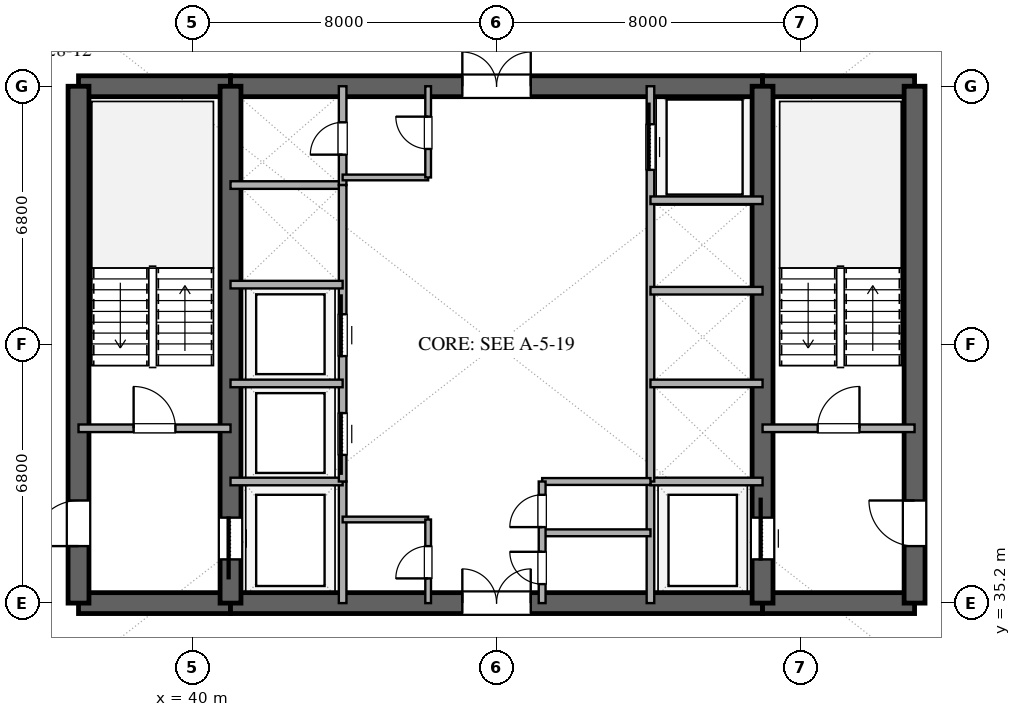
"""IFC4 building model, lengths in metres.
Left out: names, types, materials, properties, quantities, classifications, styles, units other than length and angle.
Written with IfcOpenShell. Run it as: python <this file> out.ifc"""

import sys

from ifc_helpers import new_model, si_unit, direction, frame, frame_2d, origin, place, context, subcontext, project, spatial, rectangle, extrude, element, fill, save


model = new_model("IFC4")
c1 = context("Model", 3, precision=1e-05, world=origin(), true_north=direction((0.0, 1.0)))
c2 = subcontext(c1, "Body", "Model", "MODEL_VIEW")
j1 = project(units=[si_unit("LENGTHUNIT", "METRE"), si_unit("PLANEANGLEUNIT", "RADIAN")], contexts=[c1])
p1 = place(None, origin())
s1 = spatial("IfcSite", under=j1, at=p1, CompositionType="ELEMENT")
p2 = place(p1, origin())
s2 = spatial("IfcBuilding", under=s1, at=p2, CompositionType="ELEMENT")
p3 = place(p2, frame((0.0, 0.0, 112.8)))
s3 = spatial("IfcBuildingStorey", under=s2, at=p3, CompositionType="ELEMENT", Elevation=112.8)
p4 = place(p3, frame((37.0, 35.2, 0.0), z_axis=(0.0, 0.0, 1.0), x_axis=(1.0, 0.0, 0.0)))
e1 = element("IfcWall", 1, at=p4, inside=s3, PredefinedType="SHEAR", context=c2, shape_type="SweptSolid", body=[
    extrude(rectangle(XDim=4.0, YDim=0.55, at=frame_2d((2.0, 0.0))), origin(), (0.0, 0.0, 1.0), 3.38),
])
p5 = place(p3, frame((41.0, 35.2, 0.0), z_axis=(0.0, 0.0, 1.0), x_axis=(1.0, 0.0, 0.0)))
e2 = element("IfcWall", 2, at=p5, inside=s3, PredefinedType="SHEAR", context=c2, shape_type="SweptSolid", body=[
    extrude(rectangle(XDim=14.0, YDim=0.55, at=frame_2d((7.0, 0.0))), origin(), (0.0, 0.0, 1.0), 3.38),
])
p6 = place(p5, frame((6.1, 0.0, 0.0)))
e3 = element("IfcOpeningElement", 3, at=p6, cuts=e2, PredefinedType="OPENING", context=c2, shape_type="SweptSolid", body=[
    extrude(rectangle(XDim=1.8, YDim=2.25, at=frame_2d((0.9, 1.125))), frame((0.0, 0.285, 0.0), z_axis=(0.0, -1.0, 0.0), x_axis=(1.0, 0.0, 0.0)), (0.0, 0.0, 1.0), 0.57),
])
for number, where, z_axis, x_axis in (
    (4, (55.0, 35.2, 0.0), (0.0, 0.0, 1.0), (1.0, 0.0, 0.0)),
    (5, (37.0, 48.8, 0.0), (0.0, 0.0, 1.0), (1.0, 0.0, 0.0)),
):
    element("IfcWall", number, at=place(p3, frame(where, z_axis=z_axis, x_axis=x_axis)), inside=s3, PredefinedType="SHEAR", context=c2, shape_type="SweptSolid", body=[
        extrude(rectangle(XDim=4.0, YDim=0.55, at=frame_2d((2.0, 0.0))), origin(), (0.0, 0.0, 1.0), 3.38),
    ])
p7 = place(p3, frame((41.0, 48.8, 0.0), z_axis=(0.0, 0.0, 1.0), x_axis=(1.0, 0.0, 0.0)))
e6 = element("IfcWall", 6, at=p7, inside=s3, PredefinedType="SHEAR", context=c2, shape_type="SweptSolid", body=[
    extrude(rectangle(XDim=14.0, YDim=0.55, at=frame_2d((7.0, 0.0))), origin(), (0.0, 0.0, 1.0), 3.38),
])
p8 = place(p7, frame((6.1, 0.0, 0.0)))
e7 = element("IfcOpeningElement", 7, at=p8, cuts=e6, PredefinedType="OPENING", context=c2, shape_type="SweptSolid", body=[
    extrude(rectangle(XDim=1.8, YDim=2.25, at=frame_2d((0.9, 1.125))), frame((0.0, 0.285, 0.0), z_axis=(0.0, -1.0, 0.0), x_axis=(1.0, 0.0, 0.0)), (0.0, 0.0, 1.0), 0.57),
])
p9 = place(p3, frame((55.0, 48.8, 0.0), z_axis=(0.0, 0.0, 1.0), x_axis=(1.0, 0.0, 0.0)))
e8 = element("IfcWall", 8, at=p9, inside=s3, PredefinedType="SHEAR", context=c2, shape_type="SweptSolid", body=[
    extrude(rectangle(XDim=4.0, YDim=0.55, at=frame_2d((2.0, 0.0))), origin(), (0.0, 0.0, 1.0), 3.38),
])
p10 = place(p3, frame((37.0, 35.2, 0.0), z_axis=(0.0, 0.0, 1.0), x_axis=(0.0, 1.0, 0.0)))
e9 = element("IfcWall", 9, at=p10, inside=s3, PredefinedType="SHEAR", context=c2, shape_type="SweptSolid", body=[
    extrude(rectangle(XDim=13.6, YDim=0.55, at=frame_2d((6.8, 0.0))), origin(), (0.0, 0.0, 1.0), 3.38),
])
p11 = place(p10, frame((1.5, 0.0, 0.0)))
e10 = element("IfcOpeningElement", 10, at=p11, cuts=e9, PredefinedType="OPENING", context=c2, shape_type="SweptSolid", body=[
    extrude(rectangle(XDim=1.2, YDim=2.15, at=frame_2d((0.6, 1.075))), frame((0.0, 0.285, 0.0), z_axis=(0.0, -1.0, 0.0), x_axis=(1.0, 0.0, 0.0)), (0.0, 0.0, 1.0), 0.57),
])
p12 = place(p3, frame((59.0, 35.2, 0.0), z_axis=(0.0, 0.0, 1.0), x_axis=(0.0, 1.0, 0.0)))
e11 = element("IfcWall", 11, at=p12, inside=s3, PredefinedType="SHEAR", context=c2, shape_type="SweptSolid", body=[
    extrude(rectangle(XDim=13.6, YDim=0.55, at=frame_2d((6.8, 0.0))), origin(), (0.0, 0.0, 1.0), 3.38),
])
p13 = place(p12, frame((1.5, 0.0, 0.0)))
e12 = element("IfcOpeningElement", 12, at=p13, cuts=e11, PredefinedType="OPENING", context=c2, shape_type="SweptSolid", body=[
    extrude(rectangle(XDim=1.2, YDim=2.15, at=frame_2d((0.6, 1.075))), frame((0.0, 0.285, 0.0), z_axis=(0.0, -1.0, 0.0), x_axis=(1.0, 0.0, 0.0)), (0.0, 0.0, 1.0), 0.57),
])
p14 = place(p3, frame((41.0, 35.2, 0.0), z_axis=(0.0, 0.0, 1.0), x_axis=(0.0, 1.0, 0.0)))
e13 = element("IfcWall", 13, at=p14, inside=s3, PredefinedType="SHEAR", context=c2, shape_type="SweptSolid", body=[
    extrude(rectangle(XDim=13.6, YDim=0.55, at=frame_2d((6.8, 0.0))), origin(), (0.0, 0.0, 1.0), 3.38),
])
p15 = place(p14, frame((1.15, 0.0, 0.0)))
e14 = element("IfcOpeningElement", 14, at=p15, cuts=e13, PredefinedType="OPENING", context=c2, shape_type="SweptSolid", body=[
    extrude(rectangle(XDim=1.1, YDim=2.2, at=frame_2d((0.55, 1.1))), frame((0.0, 0.285, 0.0), z_axis=(0.0, -1.0, 0.0), x_axis=(1.0, 0.0, 0.0)), (0.0, 0.0, 1.0), 0.57),
])
p16 = place(p3, frame((55.0, 35.2, 0.0), z_axis=(0.0, 0.0, 1.0), x_axis=(0.0, 1.0, 0.0)))
e15 = element("IfcWall", 15, at=p16, inside=s3, PredefinedType="SHEAR", context=c2, shape_type="SweptSolid", body=[
    extrude(rectangle(XDim=13.6, YDim=0.55, at=frame_2d((6.8, 0.0))), origin(), (0.0, 0.0, 1.0), 3.38),
])
p17 = place(p16, frame((1.15, 0.0, 0.0)))
e16 = element("IfcOpeningElement", 16, at=p17, cuts=e15, PredefinedType="OPENING", context=c2, shape_type="SweptSolid", body=[
    extrude(rectangle(XDim=1.1, YDim=2.2, at=frame_2d((0.55, 1.1))), frame((0.0, 0.285, 0.0), z_axis=(0.0, -1.0, 0.0), x_axis=(1.0, 0.0, 0.0)), (0.0, 0.0, 1.0), 0.57),
])
p18 = place(p3, frame((37.0, 39.8, 0.0), z_axis=(0.0, 0.0, 1.0), x_axis=(1.0, 0.0, 0.0)))
e17 = element("IfcWall", 17, at=p18, inside=s3, PredefinedType="SOLIDWALL", context=c2, shape_type="SweptSolid", body=[
    extrude(rectangle(XDim=4.0, YDim=0.2, at=frame_2d((2.0, 0.0))), origin(), (0.0, 0.0, 1.0), 2.74),
])
p19 = place(p18, frame((1.45, 0.0, 0.0)))
e18 = element("IfcOpeningElement", 18, at=p19, cuts=e17, PredefinedType="OPENING", context=c2, shape_type="SweptSolid", body=[
    extrude(rectangle(XDim=1.1, YDim=2.15, at=frame_2d((0.55, 1.075))), frame((0.0, 0.11, 0.0), z_axis=(0.0, -1.0, 0.0), x_axis=(1.0, 0.0, 0.0)), (0.0, 0.0, 1.0), 0.22),
])
p20 = place(p3, frame((55.0, 39.8, 0.0), z_axis=(0.0, 0.0, 1.0), x_axis=(1.0, 0.0, 0.0)))
e19 = element("IfcWall", 19, at=p20, inside=s3, PredefinedType="SOLIDWALL", context=c2, shape_type="SweptSolid", body=[
    extrude(rectangle(XDim=4.0, YDim=0.2, at=frame_2d((2.0, 0.0))), origin(), (0.0, 0.0, 1.0), 2.74),
])
p21 = place(p20, frame((1.45, 0.0, 0.0)))
e20 = element("IfcOpeningElement", 20, at=p21, cuts=e19, PredefinedType="OPENING", context=c2, shape_type="SweptSolid", body=[
    extrude(rectangle(XDim=1.1, YDim=2.15, at=frame_2d((0.55, 1.075))), frame((0.0, 0.11, 0.0), z_axis=(0.0, -1.0, 0.0), x_axis=(1.0, 0.0, 0.0)), (0.0, 0.0, 1.0), 0.22),
])
p22 = place(p3, frame((43.95, 35.2, 0.0), z_axis=(0.0, 0.0, 1.0), x_axis=(0.0, 1.0, 0.0)))
e21 = element("IfcWall", 21, at=p22, inside=s3, PredefinedType="SOLIDWALL", context=c2, shape_type="SweptSolid", body=[
    extrude(rectangle(XDim=3.2, YDim=0.2, at=frame_2d((1.6, 0.0))), origin(), (0.0, 0.0, 1.0), 2.74),
])
p23 = place(p3, frame((41.0, 38.4, 0.0), z_axis=(0.0, 0.0, 1.0), x_axis=(1.0, 0.0, 0.0)))
e22 = element("IfcWall", 22, at=p23, inside=s3, PredefinedType="SOLIDWALL", context=c2, shape_type="SweptSolid", body=[
    extrude(rectangle(XDim=2.95, YDim=0.2, at=frame_2d((1.475, 0.0))), origin(), (0.0, 0.0, 1.0), 2.74),
])
p24 = place(p3, frame((52.05, 35.2, 0.0), z_axis=(0.0, 0.0, 1.0), x_axis=(0.0, 1.0, 0.0)))
e23 = element("IfcWall", 23, at=p24, inside=s3, PredefinedType="SOLIDWALL", context=c2, shape_type="SweptSolid", body=[
    extrude(rectangle(XDim=3.2, YDim=0.2, at=frame_2d((1.6, 0.0))), origin(), (0.0, 0.0, 1.0), 2.74),
])
for number, where, z_axis, x_axis in (
    (24, (52.05, 38.4, 0.0), (0.0, 0.0, 1.0), (1.0, 0.0, 0.0)),
    (25, (41.0, 46.2, 0.0), (0.0, 0.0, 1.0), (1.0, 0.0, 0.0)),
):
    element("IfcWall", number, at=place(p3, frame(where, z_axis=z_axis, x_axis=x_axis)), inside=s3, PredefinedType="SOLIDWALL", context=c2, shape_type="SweptSolid", body=[
        extrude(rectangle(XDim=2.95, YDim=0.2, at=frame_2d((1.475, 0.0))), origin(), (0.0, 0.0, 1.0), 2.74),
    ])
p25 = place(p3, frame((43.95, 46.2, 0.0), z_axis=(0.0, 0.0, 1.0), x_axis=(0.0, 1.0, 0.0)))
e26 = element("IfcWall", 26, at=p25, inside=s3, PredefinedType="SOLIDWALL", context=c2, shape_type="SweptSolid", body=[
    extrude(rectangle(XDim=2.6, YDim=0.2, at=frame_2d((1.3, 0.0))), origin(), (0.0, 0.0, 1.0), 2.74),
])
p26 = place(p25, frame((0.8, 0.0, 0.0)))
e27 = element("IfcOpeningElement", 27, at=p26, cuts=e26, PredefinedType="OPENING", context=c2, shape_type="SweptSolid", body=[
    extrude(rectangle(XDim=0.85, YDim=2.15, at=frame_2d((0.425, 1.075))), frame((0.0, 0.11, 0.0), z_axis=(0.0, -1.0, 0.0), x_axis=(1.0, 0.0, 0.0)), (0.0, 0.0, 1.0), 0.22),
])
p27 = place(p3, frame((43.95, 38.4, 0.0), z_axis=(0.0, 0.0, 1.0), x_axis=(0.0, 1.0, 0.0)))
e28 = element("IfcWall", 28, at=p27, inside=s3, PredefinedType="SOLIDWALL", context=c2, shape_type="SweptSolid", body=[
    extrude(rectangle(XDim=7.8, YDim=0.2, at=frame_2d((3.9, 0.0))), origin(), (0.0, 0.0, 1.0), 2.74),
])
p28 = place(p27, frame((0.7, 0.0, 0.0)))
e29 = element("IfcOpeningElement", 29, at=p28, cuts=e28, PredefinedType="OPENING", context=c2, shape_type="SweptSolid", body=[
    extrude(rectangle(XDim=1.1, YDim=2.2, at=frame_2d((0.55, 1.1))), frame((0.0, 0.11, 0.0), z_axis=(0.0, -1.0, 0.0), x_axis=(1.0, 0.0, 0.0)), (0.0, 0.0, 1.0), 0.22),
])
p29 = place(p27, frame((3.3, 0.0, 0.0)))
e30 = element("IfcOpeningElement", 30, at=p29, cuts=e28, PredefinedType="OPENING", context=c2, shape_type="SweptSolid", body=[
    extrude(rectangle(XDim=1.1, YDim=2.2, at=frame_2d((0.55, 1.1))), frame((0.0, 0.11, 0.0), z_axis=(0.0, -1.0, 0.0), x_axis=(1.0, 0.0, 0.0)), (0.0, 0.0, 1.0), 0.22),
])
for number, where, z_axis, x_axis in (
    (31, (41.0, 40.98, 0.0), (0.0, 0.0, 1.0), (1.0, 0.0, 0.0)),
    (32, (41.0, 43.58, 0.0), (0.0, 0.0, 1.0), (1.0, 0.0, 0.0)),
):
    element("IfcWall", number, at=place(p3, frame(where, z_axis=z_axis, x_axis=x_axis)), inside=s3, PredefinedType="SOLIDWALL", context=c2, shape_type="SweptSolid", body=[
        extrude(rectangle(XDim=2.95, YDim=0.2, at=frame_2d((1.475, 0.0))), origin(), (0.0, 0.0, 1.0), 2.74),
    ])
p30 = place(p3, frame((52.05, 38.4, 0.0), z_axis=(0.0, 0.0, 1.0), x_axis=(0.0, 1.0, 0.0)))
e33 = element("IfcWall", 33, at=p30, inside=s3, PredefinedType="SOLIDWALL", context=c2, shape_type="SweptSolid", body=[
    extrude(rectangle(XDim=10.4, YDim=0.2, at=frame_2d((5.2, 0.0))), origin(), (0.0, 0.0, 1.0), 2.74),
])
p31 = place(p30, frame((8.2, 0.0, 0.0)))
e34 = element("IfcOpeningElement", 34, at=p31, cuts=e33, PredefinedType="OPENING", context=c2, shape_type="SweptSolid", body=[
    extrude(rectangle(XDim=1.2, YDim=2.2, at=frame_2d((0.6, 1.1))), frame((0.0, 0.11, 0.0), z_axis=(0.0, -1.0, 0.0), x_axis=(1.0, 0.0, 0.0)), (0.0, 0.0, 1.0), 0.22),
])
for number, where, z_axis, x_axis in (
    (35, (52.05, 40.98, 0.0), (0.0, 0.0, 1.0), (1.0, 0.0, 0.0)),
    (36, (52.05, 43.42, 0.0), (0.0, 0.0, 1.0), (1.0, 0.0, 0.0)),
    (37, (52.05, 45.8, 0.0), (0.0, 0.0, 1.0), (1.0, 0.0, 0.0)),
):
    element("IfcWall", number, at=place(p3, frame(where, z_axis=z_axis, x_axis=x_axis)), inside=s3, PredefinedType="SOLIDWALL", context=c2, shape_type="SweptSolid", body=[
        extrude(rectangle(XDim=2.95, YDim=0.2, at=frame_2d((1.475, 0.0))), origin(), (0.0, 0.0, 1.0), 2.74),
    ])
p32 = place(p3, frame((43.95, 37.4, 0.0), z_axis=(0.0, 0.0, 1.0), x_axis=(1.0, 0.0, 0.0)))
e38 = element("IfcWall", 38, at=p32, inside=s3, PredefinedType="PARTITIONING", context=c2, shape_type="SweptSolid", body=[
    extrude(rectangle(XDim=2.25, YDim=0.15, at=frame_2d((1.125, 0.0))), origin(), (0.0, 0.0, 1.0), 2.74),
])
p33 = place(p3, frame((46.2, 35.2, 0.0), z_axis=(0.0, 0.0, 1.0), x_axis=(0.0, 1.0, 0.0)))
e39 = element("IfcWall", 39, at=p33, inside=s3, PredefinedType="PARTITIONING", context=c2, shape_type="SweptSolid", body=[
    extrude(rectangle(XDim=2.2, YDim=0.15, at=frame_2d((1.1, 0.0))), origin(), (0.0, 0.0, 1.0), 2.74),
])
p34 = place(p33, frame((0.65, 0.0, 0.0)))
e40 = element("IfcOpeningElement", 40, at=p34, cuts=e39, PredefinedType="OPENING", context=c2, shape_type="SweptSolid", body=[
    extrude(rectangle(XDim=0.85, YDim=2.15, at=frame_2d((0.425, 1.075))), frame((0.0, 0.085, 0.0), z_axis=(0.0, -1.0, 0.0), x_axis=(1.0, 0.0, 0.0)), (0.0, 0.0, 1.0), 0.17),
])
p35 = place(p3, frame((43.95, 46.4, 0.0), z_axis=(0.0, 0.0, 1.0), x_axis=(1.0, 0.0, 0.0)))
e41 = element("IfcWall", 41, at=p35, inside=s3, PredefinedType="PARTITIONING", context=c2, shape_type="SweptSolid", body=[
    extrude(rectangle(XDim=2.25, YDim=0.15, at=frame_2d((1.125, 0.0))), origin(), (0.0, 0.0, 1.0), 2.74),
])
p36 = place(p3, frame((46.2, 46.4, 0.0), z_axis=(0.0, 0.0, 1.0), x_axis=(0.0, 1.0, 0.0)))
e42 = element("IfcWall", 42, at=p36, inside=s3, PredefinedType="PARTITIONING", context=c2, shape_type="SweptSolid", body=[
    extrude(rectangle(XDim=2.4, YDim=0.15, at=frame_2d((1.2, 0.0))), origin(), (0.0, 0.0, 1.0), 2.74),
])
p37 = place(p36, frame((0.75, 0.0, 0.0)))
e43 = element("IfcOpeningElement", 43, at=p37, cuts=e42, PredefinedType="OPENING", context=c2, shape_type="SweptSolid", body=[
    extrude(rectangle(XDim=0.85, YDim=2.15, at=frame_2d((0.425, 1.075))), frame((0.0, 0.085, 0.0), z_axis=(0.0, -1.0, 0.0), x_axis=(1.0, 0.0, 0.0)), (0.0, 0.0, 1.0), 0.17),
])
for number, where, z_axis, x_axis in (
    (44, (49.2, 37.05, 0.0), (0.0, 0.0, 1.0), (1.0, 0.0, 0.0)),
    (45, (49.2, 38.4, 0.0), (0.0, 0.0, 1.0), (1.0, 0.0, 0.0)),
):
    element("IfcWall", number, at=place(p3, frame(where, z_axis=z_axis, x_axis=x_axis)), inside=s3, PredefinedType="PLUMBINGWALL", context=c2, shape_type="SweptSolid", body=[
        extrude(rectangle(XDim=2.85, YDim=0.18, at=frame_2d((1.425, 0.0))), origin(), (0.0, 0.0, 1.0), 2.74),
    ])
p38 = place(p3, frame((49.2, 35.2, 0.0), z_axis=(0.0, 0.0, 1.0), x_axis=(0.0, 1.0, 0.0)))
e46 = element("IfcWall", 46, at=p38, inside=s3, PredefinedType="PLUMBINGWALL", context=c2, shape_type="SweptSolid", body=[
    extrude(rectangle(XDim=3.2, YDim=0.18, at=frame_2d((1.6, 0.0))), origin(), (0.0, 0.0, 1.0), 2.74),
])
p39 = place(p38, frame((0.5, 0.0, 0.0)))
e47 = element("IfcOpeningElement", 47, at=p39, cuts=e46, PredefinedType="OPENING", context=c2, shape_type="SweptSolid", body=[
    extrude(rectangle(XDim=0.85, YDim=2.1, at=frame_2d((0.425, 1.05))), frame((0.0, 0.1, 0.0), z_axis=(0.0, -1.0, 0.0), x_axis=(1.0, 0.0, 0.0)), (0.0, 0.0, 1.0), 0.2),
])
p40 = place(p38, frame((2.0, 0.0, 0.0)))
e48 = element("IfcOpeningElement", 48, at=p40, cuts=e46, PredefinedType="OPENING", context=c2, shape_type="SweptSolid", body=[
    extrude(rectangle(XDim=0.85, YDim=2.15, at=frame_2d((0.425, 1.075))), frame((0.0, 0.1, 0.0), z_axis=(0.0, -1.0, 0.0), x_axis=(1.0, 0.0, 0.0)), (0.0, 0.0, 1.0), 0.2),
])
p41 = place(p15, origin())
e49 = element("IfcDoor", 49, at=p41, inside=s3, OperationType="SLIDING_TO_LEFT", PredefinedType="DOOR", context=c2, shape_type="SweptSolid", body=[
    extrude(rectangle(XDim=1.1, YDim=2.2, at=frame_2d((0.55, 1.1))), frame((0.0, 0.025, 0.0), z_axis=(0.0, -1.0, 0.0), x_axis=(1.0, 0.0, 0.0)), (0.0, 0.0, 1.0), 0.05),
])
fill(e14, e49)
p42 = place(p17, origin())
e50 = element("IfcDoor", 50, at=p42, inside=s3, OperationType="SLIDING_TO_RIGHT", PredefinedType="DOOR", context=c2, shape_type="SweptSolid", body=[
    extrude(rectangle(XDim=1.1, YDim=2.2, at=frame_2d((0.55, 1.1))), frame((0.0, 0.025, 0.0), z_axis=(0.0, -1.0, 0.0), x_axis=(1.0, 0.0, 0.0)), (0.0, 0.0, 1.0), 0.05),
])
fill(e16, e50)
p43 = place(p11, origin())
e51 = element("IfcDoor", 51, at=p43, inside=s3, OperationType="SINGLE_SWING_LEFT", PredefinedType="DOOR", context=c2, shape_type="SweptSolid", body=[
    extrude(rectangle(XDim=1.2, YDim=2.15, at=frame_2d((0.6, 1.075))), frame((0.0, 0.025, 0.0), z_axis=(0.0, -1.0, 0.0), x_axis=(1.0, 0.0, 0.0)), (0.0, 0.0, 1.0), 0.05),
])
fill(e10, e51)
p44 = place(p13, origin())
e52 = element("IfcDoor", 52, at=p44, inside=s3, OperationType="SINGLE_SWING_RIGHT", PredefinedType="DOOR", context=c2, shape_type="SweptSolid", body=[
    extrude(rectangle(XDim=1.2, YDim=2.15, at=frame_2d((0.6, 1.075))), frame((0.0, 0.025, 0.0), z_axis=(0.0, -1.0, 0.0), x_axis=(1.0, 0.0, 0.0)), (0.0, 0.0, 1.0), 0.05),
])
fill(e12, e52)
p45 = place(p6, origin())
e53 = element("IfcDoor", 53, at=p45, inside=s3, OperationType="DOUBLE_DOOR_SINGLE_SWING", PredefinedType="DOOR", context=c2, shape_type="SweptSolid", body=[
    extrude(rectangle(XDim=1.8, YDim=2.25, at=frame_2d((0.9, 1.125))), frame((0.0, 0.025, 0.0), z_axis=(0.0, -1.0, 0.0), x_axis=(1.0, 0.0, 0.0)), (0.0, 0.0, 1.0), 0.05),
])
fill(e3, e53)
p46 = place(p8, origin())
e54 = element("IfcDoor", 54, at=p46, inside=s3, OperationType="DOUBLE_DOOR_SINGLE_SWING", PredefinedType="DOOR", context=c2, shape_type="SweptSolid", body=[
    extrude(rectangle(XDim=1.8, YDim=2.25, at=frame_2d((0.9, 1.125))), frame((0.0, 0.025, 0.0), z_axis=(0.0, -1.0, 0.0), x_axis=(1.0, 0.0, 0.0)), (0.0, 0.0, 1.0), 0.05),
])
fill(e7, e54)
p47 = place(p19, origin())
e55 = element("IfcDoor", 55, at=p47, inside=s3, OperationType="SINGLE_SWING_LEFT", PredefinedType="DOOR", context=c2, shape_type="SweptSolid", body=[
    extrude(rectangle(XDim=1.1, YDim=2.15, at=frame_2d((0.55, 1.075))), frame((0.0, 0.025, 0.0), z_axis=(0.0, -1.0, 0.0), x_axis=(1.0, 0.0, 0.0)), (0.0, 0.0, 1.0), 0.05),
])
fill(e18, e55)
p48 = place(p21, origin())
e56 = element("IfcDoor", 56, at=p48, inside=s3, OperationType="SINGLE_SWING_RIGHT", PredefinedType="DOOR", context=c2, shape_type="SweptSolid", body=[
    extrude(rectangle(XDim=1.1, YDim=2.15, at=frame_2d((0.55, 1.075))), frame((0.0, 0.025, 0.0), z_axis=(0.0, -1.0, 0.0), x_axis=(1.0, 0.0, 0.0)), (0.0, 0.0, 1.0), 0.05),
])
fill(e20, e56)
p49 = place(p26, origin())
e57 = element("IfcDoor", 57, at=p49, inside=s3, OperationType="SINGLE_SWING_LEFT", PredefinedType="DOOR", context=c2, shape_type="SweptSolid", body=[
    extrude(rectangle(XDim=0.85, YDim=2.15, at=frame_2d((0.425, 1.075))), frame((0.0, 0.025, 0.0), z_axis=(0.0, -1.0, 0.0), x_axis=(1.0, 0.0, 0.0)), (0.0, 0.0, 1.0), 0.05),
])
fill(e27, e57)
p50 = place(p28, origin())
e58 = element("IfcDoor", 58, at=p50, inside=s3, OperationType="SLIDING_TO_LEFT", PredefinedType="DOOR", context=c2, shape_type="SweptSolid", body=[
    extrude(rectangle(XDim=1.1, YDim=2.2, at=frame_2d((0.55, 1.1))), frame((0.0, 0.025, 0.0), z_axis=(0.0, -1.0, 0.0), x_axis=(1.0, 0.0, 0.0)), (0.0, 0.0, 1.0), 0.05),
])
fill(e29, e58)
p51 = place(p29, origin())
e59 = element("IfcDoor", 59, at=p51, inside=s3, OperationType="SLIDING_TO_RIGHT", PredefinedType="DOOR", context=c2, shape_type="SweptSolid", body=[
    extrude(rectangle(XDim=1.1, YDim=2.2, at=frame_2d((0.55, 1.1))), frame((0.0, 0.025, 0.0), z_axis=(0.0, -1.0, 0.0), x_axis=(1.0, 0.0, 0.0)), (0.0, 0.0, 1.0), 0.05),
])
fill(e30, e59)
p52 = place(p31, origin())
e60 = element("IfcDoor", 60, at=p52, inside=s3, OperationType="SLIDING_TO_RIGHT", PredefinedType="DOOR", context=c2, shape_type="SweptSolid", body=[
    extrude(rectangle(XDim=1.2, YDim=2.2, at=frame_2d((0.6, 1.1))), frame((0.0, 0.025, 0.0), z_axis=(0.0, -1.0, 0.0), x_axis=(1.0, 0.0, 0.0)), (0.0, 0.0, 1.0), 0.05),
])
fill(e34, e60)
p53 = place(p34, origin())
e61 = element("IfcDoor", 61, at=p53, inside=s3, OperationType="SINGLE_SWING_LEFT", PredefinedType="DOOR", context=c2, shape_type="SweptSolid", body=[
    extrude(rectangle(XDim=0.85, YDim=2.15, at=frame_2d((0.425, 1.075))), frame((0.0, 0.025, 0.0), z_axis=(0.0, -1.0, 0.0), x_axis=(1.0, 0.0, 0.0)), (0.0, 0.0, 1.0), 0.05),
])
fill(e40, e61)
p54 = place(p37, origin())
e62 = element("IfcDoor", 62, at=p54, inside=s3, OperationType="SINGLE_SWING_RIGHT", PredefinedType="DOOR", context=c2, shape_type="SweptSolid", body=[
    extrude(rectangle(XDim=0.85, YDim=2.15, at=frame_2d((0.425, 1.075))), frame((0.0, 0.025, 0.0), z_axis=(0.0, -1.0, 0.0), x_axis=(1.0, 0.0, 0.0)), (0.0, 0.0, 1.0), 0.05),
])
fill(e43, e62)
p55 = place(p39, origin())
e63 = element("IfcDoor", 63, at=p55, inside=s3, OperationType="SINGLE_SWING_RIGHT", PredefinedType="DOOR", context=c2, shape_type="SweptSolid", body=[
    extrude(rectangle(XDim=0.85, YDim=2.1, at=frame_2d((0.425, 1.05))), frame((0.0, 0.025, 0.0), z_axis=(0.0, -1.0, 0.0), x_axis=(1.0, 0.0, 0.0)), (0.0, 0.0, 1.0), 0.05),
])
fill(e47, e63)
p56 = place(p40, origin())
e64 = element("IfcDoor", 64, at=p56, inside=s3, OperationType="SINGLE_SWING_LEFT", PredefinedType="DOOR", context=c2, shape_type="SweptSolid", body=[
    extrude(rectangle(XDim=0.85, YDim=2.15, at=frame_2d((0.425, 1.075))), frame((0.0, 0.025, 0.0), z_axis=(0.0, -1.0, 0.0), x_axis=(1.0, 0.0, 0.0)), (0.0, 0.0, 1.0), 0.05),
])
fill(e48, e64)
save(model, sys.argv[1])
